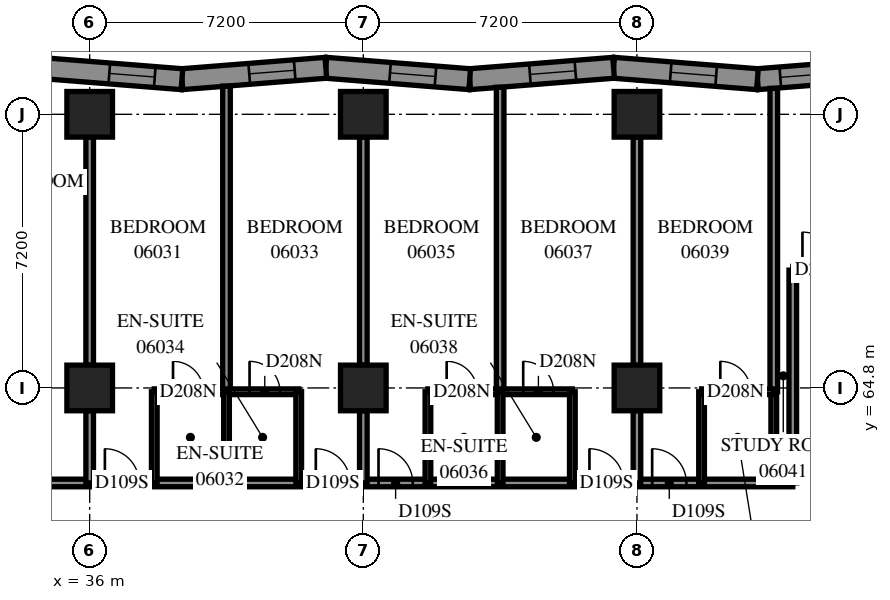
"""IFC4 building model, lengths in metres.
Left out: names, types, materials, properties, quantities, classifications, styles, units other than length and angle.
Written with IfcOpenShell. Run it as: python <this file> out.ifc"""

import sys

from ifc_helpers import new_model, si_unit, direction, frame, frame_2d, origin, origin_2d, place, context, subcontext, project, spatial, polyline, rectangle, outline, extrude, element, fill, save


model = new_model("IFC4")
c1 = context("Model", 3, precision=1e-05, world=origin(), true_north=direction((0.0, 1.0)))
c2 = subcontext(c1, "Body", "Model", "MODEL_VIEW")
j1 = project(units=[si_unit("LENGTHUNIT", "METRE"), si_unit("PLANEANGLEUNIT", "RADIAN")], contexts=[c1])
p1 = place(None, origin())
s1 = spatial("IfcSite", under=j1, at=p1, CompositionType="ELEMENT")
p2 = place(p1, origin())
s2 = spatial("IfcBuilding", under=s1, at=p2, CompositionType="ELEMENT")
p3 = place(p2, frame((0.0, 0.0, 27.0)))
s3 = spatial("IfcBuildingStorey", under=s2, at=p3, CompositionType="ELEMENT", Elevation=27.0)
for number, where, z_axis, x_axis in (
    (1, (36.0, 64.8, 0.0), (0.0, 0.0, 1.0), (1.0, 0.0, 0.0)),
    (2, (36.0, 72.0, 0.0), (0.0, 0.0, 1.0), (1.0, 0.0, 0.0)),
    (3, (43.2, 64.8, 0.0), (0.0, 0.0, 1.0), (1.0, 0.0, 0.0)),
    (4, (43.2, 72.0, 0.0), (0.0, 0.0, 1.0), (1.0, 0.0, 0.0)),
    (5, (50.4, 64.8, 0.0), (0.0, 0.0, 1.0), (1.0, 0.0, 0.0)),
    (6, (50.4, 72.0, 0.0), (0.0, 0.0, 1.0), (1.0, 0.0, 0.0)),
):
    element("IfcColumn", number, at=place(p3, frame(where, z_axis=z_axis, x_axis=x_axis)), inside=s3, PredefinedType="COLUMN", context=c2, shape_type="SweptSolid", body=[
        extrude(rectangle(XDim=1.2, YDim=1.2, at=origin_2d()), origin(), (0.0, 0.0, 1.0), 3.1),
    ])
p4 = place(p3, frame((57.356, 73.224, 0.0), z_axis=(0.0, 0.0, 1.0), x_axis=(-0.9968746163, -0.078999996, 0.0)))
e7 = element("IfcWall", 7, at=p4, inside=s3, PredefinedType="SOLIDWALL", context=c2, shape_type="SweptSolid", body=[
    extrude(outline(polyline([(-0.022, -0.275), (3.776, -0.275), (3.819, 0.275), (0.022, 0.275), (-0.022, -0.275)])), origin(), (0.0, 0.0, 1.0), 3.1),
])
p5 = place(p4, frame((0.394, 0.0, 0.5)))
e8 = element("IfcOpeningElement", 8, at=p5, cuts=e7, PredefinedType="OPENING", context=c2, shape_type="SweptSolid", body=[
    extrude(rectangle(XDim=2.8, YDim=2.45, at=frame_2d((1.4, 1.225))), frame((0.0, 0.285, 0.0), z_axis=(0.0, -1.0, 0.0), x_axis=(1.0, 0.0, 0.0)), (0.0, 0.0, 1.0), 0.57),
])
p6 = place(p3, frame((53.571, 72.924, 0.0), z_axis=(0.0, 0.0, 1.0), x_axis=(-0.9968747806, 0.0789979222, 0.0)))
e9 = element("IfcWall", 9, at=p6, inside=s3, PredefinedType="SOLIDWALL", context=c2, shape_type="SweptSolid", body=[
    extrude(outline(polyline([(0.022, -0.275), (3.819, -0.275), (3.776, 0.275), (-0.022, 0.275), (0.022, -0.275)])), origin(), (0.0, 0.0, 1.0), 3.1),
])
p7 = place(p6, frame((1.09, 0.0, 0.5)))
e10 = element("IfcOpeningElement", 10, at=p7, cuts=e9, PredefinedType="OPENING", context=c2, shape_type="SweptSolid", body=[
    extrude(rectangle(XDim=1.2, YDim=2.45, at=frame_2d((0.6, 1.225))), frame((0.0, 0.285, 0.0), z_axis=(0.0, -1.0, 0.0), x_axis=(1.0, 0.0, 0.0)), (0.0, 0.0, 1.0), 0.57),
])
p8 = place(p3, frame((49.785, 73.224, 0.0), z_axis=(0.0, 0.0, 1.0), x_axis=(-0.9968746163, -0.078999996, 0.0)))
e11 = element("IfcWall", 11, at=p8, inside=s3, PredefinedType="SOLIDWALL", context=c2, shape_type="SweptSolid", body=[
    extrude(outline(polyline([(-0.022, -0.275), (3.776, -0.275), (3.819, 0.275), (0.022, 0.275), (-0.022, -0.275)])), origin(), (0.0, 0.0, 1.0), 3.1),
])
p9 = place(p8, frame((1.008, 0.0, 0.5)))
e12 = element("IfcOpeningElement", 12, at=p9, cuts=e11, PredefinedType="OPENING", context=c2, shape_type="SweptSolid", body=[
    extrude(rectangle(XDim=1.2, YDim=2.45, at=frame_2d((0.6, 1.225))), frame((0.0, 0.285, 0.0), z_axis=(0.0, -1.0, 0.0), x_axis=(1.0, 0.0, 0.0)), (0.0, 0.0, 1.0), 0.57),
])
p10 = place(p3, frame((45.999, 72.924, 0.0), z_axis=(0.0, 0.0, 1.0), x_axis=(-0.9968746163, 0.078999996, 0.0)))
e13 = element("IfcWall", 13, at=p10, inside=s3, PredefinedType="SOLIDWALL", context=c2, shape_type="SweptSolid", body=[
    extrude(outline(polyline([(0.022, -0.275), (3.819, -0.275), (3.776, 0.275), (-0.022, 0.275), (0.022, -0.275)])), origin(), (0.0, 0.0, 1.0), 3.1),
])
p11 = place(p10, frame((0.904, 0.0, 0.5)))
e14 = element("IfcOpeningElement", 14, at=p11, cuts=e13, PredefinedType="OPENING", context=c2, shape_type="SweptSolid", body=[
    extrude(rectangle(XDim=1.2, YDim=2.45, at=frame_2d((0.6, 1.225))), frame((0.0, 0.285, 0.0), z_axis=(0.0, -1.0, 0.0), x_axis=(1.0, 0.0, 0.0)), (0.0, 0.0, 1.0), 0.57),
])
p12 = place(p3, frame((42.214, 73.224, 0.0), z_axis=(0.0, 0.0, 1.0), x_axis=(-0.9968746163, -0.078999996, 0.0)))
e15 = element("IfcWall", 15, at=p12, inside=s3, PredefinedType="SOLIDWALL", context=c2, shape_type="SweptSolid", body=[
    extrude(outline(polyline([(-0.022, -0.275), (3.776, -0.275), (3.819, 0.275), (0.022, 0.275), (-0.022, -0.275)])), origin(), (0.0, 0.0, 1.0), 3.1),
])
p13 = place(p12, frame((0.822, 0.0, 0.5)))
e16 = element("IfcOpeningElement", 16, at=p13, cuts=e15, PredefinedType="OPENING", context=c2, shape_type="SweptSolid", body=[
    extrude(rectangle(XDim=1.2, YDim=2.45, at=frame_2d((0.6, 1.225))), frame((0.0, 0.285, 0.0), z_axis=(0.0, -1.0, 0.0), x_axis=(1.0, 0.0, 0.0)), (0.0, 0.0, 1.0), 0.57),
])
p14 = place(p3, frame((38.428, 72.924, 0.0), z_axis=(0.0, 0.0, 1.0), x_axis=(-0.9968746163, 0.078999996, 0.0)))
e17 = element("IfcWall", 17, at=p14, inside=s3, PredefinedType="SOLIDWALL", context=c2, shape_type="SweptSolid", body=[
    extrude(outline(polyline([(0.022, -0.275), (3.819, -0.275), (3.776, 0.275), (-0.022, 0.275), (0.022, -0.275)])), origin(), (0.0, 0.0, 1.0), 3.1),
])
p15 = place(p14, frame((0.718, 0.0, 0.5)))
e18 = element("IfcOpeningElement", 18, at=p15, cuts=e17, PredefinedType="OPENING", context=c2, shape_type="SweptSolid", body=[
    extrude(rectangle(XDim=1.2, YDim=2.45, at=frame_2d((0.6, 1.225))), frame((0.0, 0.285, 0.0), z_axis=(0.0, -1.0, 0.0), x_axis=(1.0, 0.0, 0.0)), (0.0, 0.0, 1.0), 0.57),
])
p16 = place(p3, frame((33.502, 62.3, 0.0), z_axis=(0.0, 0.0, 1.0), x_axis=(1.0, 0.0, 0.0)))
e19 = element("IfcWall", 19, at=p16, inside=s3, PredefinedType="PARTITIONING", context=c2, shape_type="SweptSolid", body=[
    extrude(rectangle(XDim=20.998, YDim=0.2, at=frame_2d((10.499, 0.0))), origin(), (0.0, 0.0, 1.0), 3.1),
])
p17 = place(p16, frame((2.898, 0.0, 0.0)))
e20 = element("IfcOpeningElement", 20, at=p17, cuts=e19, PredefinedType="OPENING", context=c2, shape_type="SweptSolid", body=[
    extrude(rectangle(XDim=0.9, YDim=2.1, at=frame_2d((0.45, 1.05))), frame((0.0, 0.11, 0.0), z_axis=(0.0, -1.0, 0.0), x_axis=(1.0, 0.0, 0.0)), (0.0, 0.0, 1.0), 0.22),
])
p18 = place(p16, frame((8.448, 0.0, 0.0)))
e21 = element("IfcOpeningElement", 21, at=p18, cuts=e19, PredefinedType="OPENING", context=c2, shape_type="SweptSolid", body=[
    extrude(rectangle(XDim=0.9, YDim=2.1, at=frame_2d((0.45, 1.05))), frame((0.0, 0.11, 0.0), z_axis=(0.0, -1.0, 0.0), x_axis=(1.0, 0.0, 0.0)), (0.0, 0.0, 1.0), 0.22),
])
p19 = place(p16, frame((10.098, 0.0, 0.0)))
e22 = element("IfcOpeningElement", 22, at=p19, cuts=e19, PredefinedType="OPENING", context=c2, shape_type="SweptSolid", body=[
    extrude(rectangle(XDim=0.9, YDim=2.1, at=frame_2d((0.45, 1.05))), frame((0.0, 0.11, 0.0), z_axis=(0.0, -1.0, 0.0), x_axis=(1.0, 0.0, 0.0)), (0.0, 0.0, 1.0), 0.22),
])
p20 = place(p16, frame((15.648, 0.0, 0.0)))
e23 = element("IfcOpeningElement", 23, at=p20, cuts=e19, PredefinedType="OPENING", context=c2, shape_type="SweptSolid", body=[
    extrude(rectangle(XDim=0.9, YDim=2.1, at=frame_2d((0.45, 1.05))), frame((0.0, 0.11, 0.0), z_axis=(0.0, -1.0, 0.0), x_axis=(1.0, 0.0, 0.0)), (0.0, 0.0, 1.0), 0.22),
])
p21 = place(p16, frame((17.298, 0.0, 0.0)))
e24 = element("IfcOpeningElement", 24, at=p21, cuts=e19, PredefinedType="OPENING", context=c2, shape_type="SweptSolid", body=[
    extrude(rectangle(XDim=0.9, YDim=2.1, at=frame_2d((0.45, 1.05))), frame((0.0, 0.11, 0.0), z_axis=(0.0, -1.0, 0.0), x_axis=(1.0, 0.0, 0.0)), (0.0, 0.0, 1.0), 0.22),
])
p22 = place(p3, frame((54.5, 67.9, 0.0), z_axis=(0.0, 0.0, 1.0), x_axis=(1.0, 0.0, 0.0)))
e25 = element("IfcWall", 25, at=p22, inside=s3, PredefinedType="PARTITIONING", context=c2, shape_type="SweptSolid", body=[
    extrude(rectangle(XDim=20.6, YDim=0.2, at=frame_2d((10.3, 0.0))), origin(), (0.0, 0.0, 1.0), 3.1),
])
p23 = place(p22, frame((0.255, 0.0, 0.0)))
e26 = element("IfcOpeningElement", 26, at=p23, cuts=e25, PredefinedType="OPENING", context=c2, shape_type="SweptSolid", body=[
    extrude(rectangle(XDim=1.0, YDim=2.1, at=frame_2d((0.5, 1.05))), frame((0.0, 0.11, 0.0), z_axis=(0.0, -1.0, 0.0), x_axis=(1.0, 0.0, 0.0)), (0.0, 0.0, 1.0), 0.22),
])
p24 = place(p22, frame((19.345, 0.0, 0.0)))
e27 = element("IfcOpeningElement", 27, at=p24, cuts=e25, PredefinedType="OPENING", context=c2, shape_type="SweptSolid", body=[
    extrude(rectangle(XDim=1.0, YDim=2.1, at=frame_2d((0.5, 1.05))), frame((0.0, 0.11, 0.0), z_axis=(0.0, -1.0, 0.0), x_axis=(1.0, 0.0, 0.0)), (0.0, 0.0, 1.0), 0.22),
])
p25 = place(p22, frame((5.45, 0.0, 0.0)))
e28 = element("IfcOpeningElement", 28, at=p25, cuts=e25, PredefinedType="OPENING", context=c2, shape_type="SweptSolid", body=[
    extrude(rectangle(XDim=0.9, YDim=2.1, at=frame_2d((0.45, 1.05))), frame((0.0, 0.11, 0.0), z_axis=(0.0, -1.0, 0.0), x_axis=(1.0, 0.0, 0.0)), (0.0, 0.0, 1.0), 0.22),
])
p26 = place(p22, frame((7.1, 0.0, 0.0)))
e29 = element("IfcOpeningElement", 29, at=p26, cuts=e25, PredefinedType="OPENING", context=c2, shape_type="SweptSolid", body=[
    extrude(rectangle(XDim=0.9, YDim=2.1, at=frame_2d((0.45, 1.05))), frame((0.0, 0.11, 0.0), z_axis=(0.0, -1.0, 0.0), x_axis=(1.0, 0.0, 0.0)), (0.0, 0.0, 1.0), 0.22),
])
p27 = place(p22, frame((12.65, 0.0, 0.0)))
e30 = element("IfcOpeningElement", 30, at=p27, cuts=e25, PredefinedType="OPENING", context=c2, shape_type="SweptSolid", body=[
    extrude(rectangle(XDim=0.9, YDim=2.1, at=frame_2d((0.45, 1.05))), frame((0.0, 0.11, 0.0), z_axis=(0.0, -1.0, 0.0), x_axis=(1.0, 0.0, 0.0)), (0.0, 0.0, 1.0), 0.22),
])
p28 = place(p22, frame((14.3, 0.0, 0.0)))
e31 = element("IfcOpeningElement", 31, at=p28, cuts=e25, PredefinedType="OPENING", context=c2, shape_type="SweptSolid", body=[
    extrude(rectangle(XDim=0.9, YDim=2.1, at=frame_2d((0.45, 1.05))), frame((0.0, 0.11, 0.0), z_axis=(0.0, -1.0, 0.0), x_axis=(1.0, 0.0, 0.0)), (0.0, 0.0, 1.0), 0.22),
])
p29 = place(p3, frame((39.6, 64.7, 0.0), z_axis=(0.0, 0.0, 1.0), x_axis=(0.0, 1.0, 0.0)))
e32 = element("IfcWall", 32, at=p29, inside=s3, PredefinedType="PARTITIONING", context=c2, shape_type="SweptSolid", body=[
    extrude(rectangle(XDim=8.041, YDim=0.2, at=frame_2d((4.021, 0.0))), origin(), (0.0, 0.0, 1.0), 3.1),
])
p30 = place(p3, frame((46.8, 64.7, 0.0), z_axis=(0.0, 0.0, 1.0), x_axis=(0.0, 1.0, 0.0)))
e33 = element("IfcWall", 33, at=p30, inside=s3, PredefinedType="PARTITIONING", context=c2, shape_type="SweptSolid", body=[
    extrude(rectangle(XDim=8.012, YDim=0.2, at=frame_2d((4.006, 0.0))), origin(), (0.0, 0.0, 1.0), 3.1),
])
p31 = place(p3, frame((54.0, 64.7, 0.0), z_axis=(0.0, 0.0, 1.0), x_axis=(0.0, 1.0, 0.0)))
e34 = element("IfcWall", 34, at=p31, inside=s3, PredefinedType="PARTITIONING", context=c2, shape_type="SweptSolid", body=[
    extrude(rectangle(XDim=7.982, YDim=0.2, at=frame_2d((3.991, 0.0))), origin(), (0.0, 0.0, 1.0), 3.1),
])
for number, where, z_axis, x_axis in (
    (35, (36.0, 65.4, 0.0), (0.0, 0.0, 1.0), (0.0, 1.0, 0.0)),
    (36, (43.2, 65.4, 0.0), (0.0, 0.0, 1.0), (0.0, 1.0, 0.0)),
    (37, (50.4, 65.4, 0.0), (0.0, 0.0, 1.0), (0.0, 1.0, 0.0)),
):
    element("IfcWall", number, at=place(p3, frame(where, z_axis=z_axis, x_axis=x_axis)), inside=s3, PredefinedType="PARTITIONING", context=c2, shape_type="SweptSolid", body=[
        extrude(rectangle(XDim=6.0, YDim=0.2, at=frame_2d((3.0, 0.0))), origin(), (0.0, 0.0, 1.0), 3.1),
    ])
p32 = place(p3, frame((54.5, 62.302, 0.0), z_axis=(0.0, 0.0, 1.0), x_axis=(0.0, 1.0, 0.0)))
e38 = element("IfcWall", 38, at=p32, inside=s3, PredefinedType="PARTITIONING", context=c2, shape_type="SweptSolid", body=[
    extrude(rectangle(XDim=5.598, YDim=0.2, at=frame_2d((2.799, 0.0))), origin(), (0.0, 0.0, 1.0), 3.1),
])
p33 = place(p3, frame((44.9, 64.7, 0.0), z_axis=(0.0, 0.0, 1.0), x_axis=(1.0, 0.0, 0.0)))
e39 = element("IfcWall", 39, at=p33, inside=s3, PredefinedType="PARTITIONING", context=c2, shape_type="SweptSolid", body=[
    extrude(rectangle(XDim=3.8, YDim=0.15, at=frame_2d((1.9, 0.0))), origin(), (0.0, 0.0, 1.0), 3.1),
])
p34 = place(p33, frame((0.493, 0.0, 0.0)))
e40 = element("IfcOpeningElement", 40, at=p34, cuts=e39, PredefinedType="OPENING", context=c2, shape_type="SweptSolid", body=[
    extrude(rectangle(XDim=0.8, YDim=2.1, at=frame_2d((0.4, 1.05))), frame((0.0, 0.085, 0.0), z_axis=(0.0, -1.0, 0.0), x_axis=(1.0, 0.0, 0.0)), (0.0, 0.0, 1.0), 0.17),
])
p35 = place(p33, frame((2.507, 0.0, 0.0)))
e41 = element("IfcOpeningElement", 41, at=p35, cuts=e39, PredefinedType="OPENING", context=c2, shape_type="SweptSolid", body=[
    extrude(rectangle(XDim=0.8, YDim=2.1, at=frame_2d((0.4, 1.05))), frame((0.0, 0.085, 0.0), z_axis=(0.0, -1.0, 0.0), x_axis=(1.0, 0.0, 0.0)), (0.0, 0.0, 1.0), 0.17),
])
p36 = place(p3, frame((37.7, 64.7, 0.0), z_axis=(0.0, 0.0, 1.0), x_axis=(1.0, 0.0, 0.0)))
e42 = element("IfcWall", 42, at=p36, inside=s3, PredefinedType="PARTITIONING", context=c2, shape_type="SweptSolid", body=[
    extrude(rectangle(XDim=3.8, YDim=0.15, at=frame_2d((1.9, 0.0))), origin(), (0.0, 0.0, 1.0), 3.1),
])
p37 = place(p36, frame((0.493, 0.0, 0.0)))
e43 = element("IfcOpeningElement", 43, at=p37, cuts=e42, PredefinedType="OPENING", context=c2, shape_type="SweptSolid", body=[
    extrude(rectangle(XDim=0.8, YDim=2.1, at=frame_2d((0.4, 1.05))), frame((0.0, 0.085, 0.0), z_axis=(0.0, -1.0, 0.0), x_axis=(1.0, 0.0, 0.0)), (0.0, 0.0, 1.0), 0.17),
])
p38 = place(p36, frame((2.507, 0.0, 0.0)))
e44 = element("IfcOpeningElement", 44, at=p38, cuts=e42, PredefinedType="OPENING", context=c2, shape_type="SweptSolid", body=[
    extrude(rectangle(XDim=0.8, YDim=2.1, at=frame_2d((0.4, 1.05))), frame((0.0, 0.085, 0.0), z_axis=(0.0, -1.0, 0.0), x_axis=(1.0, 0.0, 0.0)), (0.0, 0.0, 1.0), 0.17),
])
for number, where, z_axis, x_axis in (
    (45, (37.7, 62.3, 0.0), (0.0, 0.0, 1.0), (0.0, 1.0, 0.0)),
    (46, (39.6, 62.3, 0.0), (0.0, 0.0, 1.0), (0.0, 1.0, 0.0)),
    (47, (41.5, 62.3, 0.0), (0.0, 0.0, 1.0), (0.0, 1.0, 0.0)),
    (48, (44.9, 62.3, 0.0), (0.0, 0.0, 1.0), (0.0, 1.0, 0.0)),
    (49, (46.8, 62.3, 0.0), (0.0, 0.0, 1.0), (0.0, 1.0, 0.0)),
    (50, (48.7, 62.3, 0.0), (0.0, 0.0, 1.0), (0.0, 1.0, 0.0)),
    (51, (52.1, 62.3, 0.0), (0.0, 0.0, 1.0), (0.0, 1.0, 0.0)),
    (52, (54.0, 62.3, 0.0), (0.0, 0.0, 1.0), (0.0, 1.0, 0.0)),
):
    element("IfcWall", number, at=place(p3, frame(where, z_axis=z_axis, x_axis=x_axis)), inside=s3, PredefinedType="PARTITIONING", context=c2, shape_type="SweptSolid", body=[
        extrude(rectangle(XDim=2.4, YDim=0.15, at=frame_2d((1.2, 0.0))), origin(), (0.0, 0.0, 1.0), 3.1),
    ])
for number, where, z_axis, x_axis in (
    (53, (36.0, 62.3, 0.0), (0.0, 0.0, 1.0), (0.0, 1.0, 0.0)),
    (54, (43.2, 62.3, 0.0), (0.0, 0.0, 1.0), (0.0, 1.0, 0.0)),
    (55, (50.4, 62.3, 0.0), (0.0, 0.0, 1.0), (0.0, 1.0, 0.0)),
):
    element("IfcWall", number, at=place(p3, frame(where, z_axis=z_axis, x_axis=x_axis)), inside=s3, PredefinedType="PARTITIONING", context=c2, shape_type="SweptSolid", body=[
        extrude(rectangle(XDim=1.9, YDim=0.2, at=frame_2d((0.95, 0.0))), origin(), (0.0, 0.0, 1.0), 3.1),
    ])
p39 = place(p3, frame((52.1, 64.7, 0.0), z_axis=(0.0, 0.0, 1.0), x_axis=(1.0, 0.0, 0.0)))
e56 = element("IfcWall", 56, at=p39, inside=s3, PredefinedType="PARTITIONING", context=c2, shape_type="SweptSolid", body=[
    extrude(rectangle(XDim=1.9, YDim=0.15, at=frame_2d((0.95, 0.0))), origin(), (0.0, 0.0, 1.0), 3.1),
])
p40 = place(p39, frame((0.493, 0.0, 0.0)))
e57 = element("IfcOpeningElement", 57, at=p40, cuts=e56, PredefinedType="OPENING", context=c2, shape_type="SweptSolid", body=[
    extrude(rectangle(XDim=0.8, YDim=2.1, at=frame_2d((0.4, 1.05))), frame((0.0, 0.085, 0.0), z_axis=(0.0, -1.0, 0.0), x_axis=(1.0, 0.0, 0.0)), (0.0, 0.0, 1.0), 0.17),
])
p41 = place(p5, origin())
e58 = element("IfcWindow", 58, at=p41, inside=s3, PartitioningType="SINGLE_PANEL", PredefinedType="WINDOW", context=c2, shape_type="SweptSolid", body=[
    extrude(rectangle(XDim=2.8, YDim=2.45, at=frame_2d((1.4, 1.225))), frame((0.0, 0.155, 0.0), z_axis=(0.0, -1.0, 0.0), x_axis=(1.0, 0.0, 0.0)), (0.0, 0.0, 1.0), 0.06),
])
fill(e8, e58)
p42 = place(p7, origin())
e59 = element("IfcWindow", 59, at=p42, inside=s3, PartitioningType="SINGLE_PANEL", PredefinedType="WINDOW", context=c2, shape_type="SweptSolid", body=[
    extrude(rectangle(XDim=1.2, YDim=2.45, at=frame_2d((0.6, 1.225))), frame((0.0, 0.155, 0.0), z_axis=(0.0, -1.0, 0.0), x_axis=(1.0, 0.0, 0.0)), (0.0, 0.0, 1.0), 0.06),
])
fill(e10, e59)
p43 = place(p9, origin())
e60 = element("IfcWindow", 60, at=p43, inside=s3, PartitioningType="SINGLE_PANEL", PredefinedType="WINDOW", context=c2, shape_type="SweptSolid", body=[
    extrude(rectangle(XDim=1.2, YDim=2.45, at=frame_2d((0.6, 1.225))), frame((0.0, 0.155, 0.0), z_axis=(0.0, -1.0, 0.0), x_axis=(1.0, 0.0, 0.0)), (0.0, 0.0, 1.0), 0.06),
])
fill(e12, e60)
p44 = place(p11, origin())
e61 = element("IfcWindow", 61, at=p44, inside=s3, PartitioningType="SINGLE_PANEL", PredefinedType="WINDOW", context=c2, shape_type="SweptSolid", body=[
    extrude(rectangle(XDim=1.2, YDim=2.45, at=frame_2d((0.6, 1.225))), frame((0.0, 0.155, 0.0), z_axis=(0.0, -1.0, 0.0), x_axis=(1.0, 0.0, 0.0)), (0.0, 0.0, 1.0), 0.06),
])
fill(e14, e61)
p45 = place(p13, origin())
e62 = element("IfcWindow", 62, at=p45, inside=s3, PartitioningType="SINGLE_PANEL", PredefinedType="WINDOW", context=c2, shape_type="SweptSolid", body=[
    extrude(rectangle(XDim=1.2, YDim=2.45, at=frame_2d((0.6, 1.225))), frame((0.0, 0.155, 0.0), z_axis=(0.0, -1.0, 0.0), x_axis=(1.0, 0.0, 0.0)), (0.0, 0.0, 1.0), 0.06),
])
fill(e16, e62)
p46 = place(p15, origin())
e63 = element("IfcWindow", 63, at=p46, inside=s3, PartitioningType="SINGLE_PANEL", PredefinedType="WINDOW", context=c2, shape_type="SweptSolid", body=[
    extrude(rectangle(XDim=1.2, YDim=2.45, at=frame_2d((0.6, 1.225))), frame((0.0, 0.155, 0.0), z_axis=(0.0, -1.0, 0.0), x_axis=(1.0, 0.0, 0.0)), (0.0, 0.0, 1.0), 0.06),
])
fill(e18, e63)
p47 = place(p17, origin())
e64 = element("IfcDoor", 64, at=p47, inside=s3, OperationType="SINGLE_SWING_RIGHT", PredefinedType="DOOR", context=c2, shape_type="SweptSolid", body=[
    extrude(rectangle(XDim=0.9, YDim=2.1, at=frame_2d((0.45, 1.05))), frame((0.0, 0.025, 0.0), z_axis=(0.0, -1.0, 0.0), x_axis=(1.0, 0.0, 0.0)), (0.0, 0.0, 1.0), 0.05),
])
fill(e20, e64)
p48 = place(p37, origin())
e65 = element("IfcDoor", 65, at=p48, inside=s3, OperationType="SINGLE_SWING_RIGHT", PredefinedType="DOOR", context=c2, shape_type="SweptSolid", body=[
    extrude(rectangle(XDim=0.8, YDim=2.1, at=frame_2d((0.4, 1.05))), frame((0.0, 0.025, 0.0), z_axis=(0.0, -1.0, 0.0), x_axis=(1.0, 0.0, 0.0)), (0.0, 0.0, 1.0), 0.05),
])
fill(e43, e65)
p49 = place(p18, origin())
e66 = element("IfcDoor", 66, at=p49, inside=s3, OperationType="SINGLE_SWING_LEFT", PredefinedType="DOOR", context=c2, shape_type="SweptSolid", body=[
    extrude(rectangle(XDim=0.9, YDim=2.1, at=frame_2d((0.45, 1.05))), frame((0.0, 0.025, 0.0), z_axis=(0.0, -1.0, 0.0), x_axis=(1.0, 0.0, 0.0)), (0.0, 0.0, 1.0), 0.05),
])
fill(e21, e66)
p50 = place(p38, origin())
e67 = element("IfcDoor", 67, at=p50, inside=s3, OperationType="SINGLE_SWING_RIGHT", PredefinedType="DOOR", context=c2, shape_type="SweptSolid", body=[
    extrude(rectangle(XDim=0.8, YDim=2.1, at=frame_2d((0.4, 1.05))), frame((0.0, 0.025, 0.0), z_axis=(0.0, -1.0, 0.0), x_axis=(1.0, 0.0, 0.0)), (0.0, 0.0, 1.0), 0.05),
])
fill(e44, e67)
p51 = place(p19, origin())
e68 = element("IfcDoor", 68, at=p51, inside=s3, OperationType="SINGLE_SWING_RIGHT", PredefinedType="DOOR", context=c2, shape_type="SweptSolid", body=[
    extrude(rectangle(XDim=0.9, YDim=2.1, at=frame_2d((0.45, 1.05))), frame((0.0, 0.025, 0.0), z_axis=(0.0, -1.0, 0.0), x_axis=(1.0, 0.0, 0.0)), (0.0, 0.0, 1.0), 0.05),
])
fill(e22, e68)
p52 = place(p34, origin())
e69 = element("IfcDoor", 69, at=p52, inside=s3, OperationType="SINGLE_SWING_RIGHT", PredefinedType="DOOR", context=c2, shape_type="SweptSolid", body=[
    extrude(rectangle(XDim=0.8, YDim=2.1, at=frame_2d((0.4, 1.05))), frame((0.0, 0.025, 0.0), z_axis=(0.0, -1.0, 0.0), x_axis=(1.0, 0.0, 0.0)), (0.0, 0.0, 1.0), 0.05),
])
fill(e40, e69)
p53 = place(p20, origin())
e70 = element("IfcDoor", 70, at=p53, inside=s3, OperationType="SINGLE_SWING_LEFT", PredefinedType="DOOR", context=c2, shape_type="SweptSolid", body=[
    extrude(rectangle(XDim=0.9, YDim=2.1, at=frame_2d((0.45, 1.05))), frame((0.0, 0.025, 0.0), z_axis=(0.0, -1.0, 0.0), x_axis=(1.0, 0.0, 0.0)), (0.0, 0.0, 1.0), 0.05),
])
fill(e23, e70)
p54 = place(p35, origin())
e71 = element("IfcDoor", 71, at=p54, inside=s3, OperationType="SINGLE_SWING_RIGHT", PredefinedType="DOOR", context=c2, shape_type="SweptSolid", body=[
    extrude(rectangle(XDim=0.8, YDim=2.1, at=frame_2d((0.4, 1.05))), frame((0.0, 0.025, 0.0), z_axis=(0.0, -1.0, 0.0), x_axis=(1.0, 0.0, 0.0)), (0.0, 0.0, 1.0), 0.05),
])
fill(e41, e71)
p55 = place(p21, origin())
e72 = element("IfcDoor", 72, at=p55, inside=s3, OperationType="SINGLE_SWING_RIGHT", PredefinedType="DOOR", context=c2, shape_type="SweptSolid", body=[
    extrude(rectangle(XDim=0.9, YDim=2.1, at=frame_2d((0.45, 1.05))), frame((0.0, 0.025, 0.0), z_axis=(0.0, -1.0, 0.0), x_axis=(1.0, 0.0, 0.0)), (0.0, 0.0, 1.0), 0.05),
])
fill(e24, e72)
p56 = place(p40, origin())
e73 = element("IfcDoor", 73, at=p56, inside=s3, OperationType="SINGLE_SWING_RIGHT", PredefinedType="DOOR", context=c2, shape_type="SweptSolid", body=[
    extrude(rectangle(XDim=0.8, YDim=2.1, at=frame_2d((0.4, 1.05))), frame((0.0, 0.025, 0.0), z_axis=(0.0, -1.0, 0.0), x_axis=(1.0, 0.0, 0.0)), (0.0, 0.0, 1.0), 0.05),
])
fill(e57, e73)
p57 = place(p23, origin())
e74 = element("IfcDoor", 74, at=p57, inside=s3, OperationType="SINGLE_SWING_LEFT", PredefinedType="DOOR", context=c2, shape_type="SweptSolid", body=[
    extrude(rectangle(XDim=1.0, YDim=2.1, at=frame_2d((0.5, 1.05))), frame((0.0, 0.025, 0.0), z_axis=(0.0, -1.0, 0.0), x_axis=(1.0, 0.0, 0.0)), (0.0, 0.0, 1.0), 0.05),
])
fill(e26, e74)
save(model, sys.argv[1])
